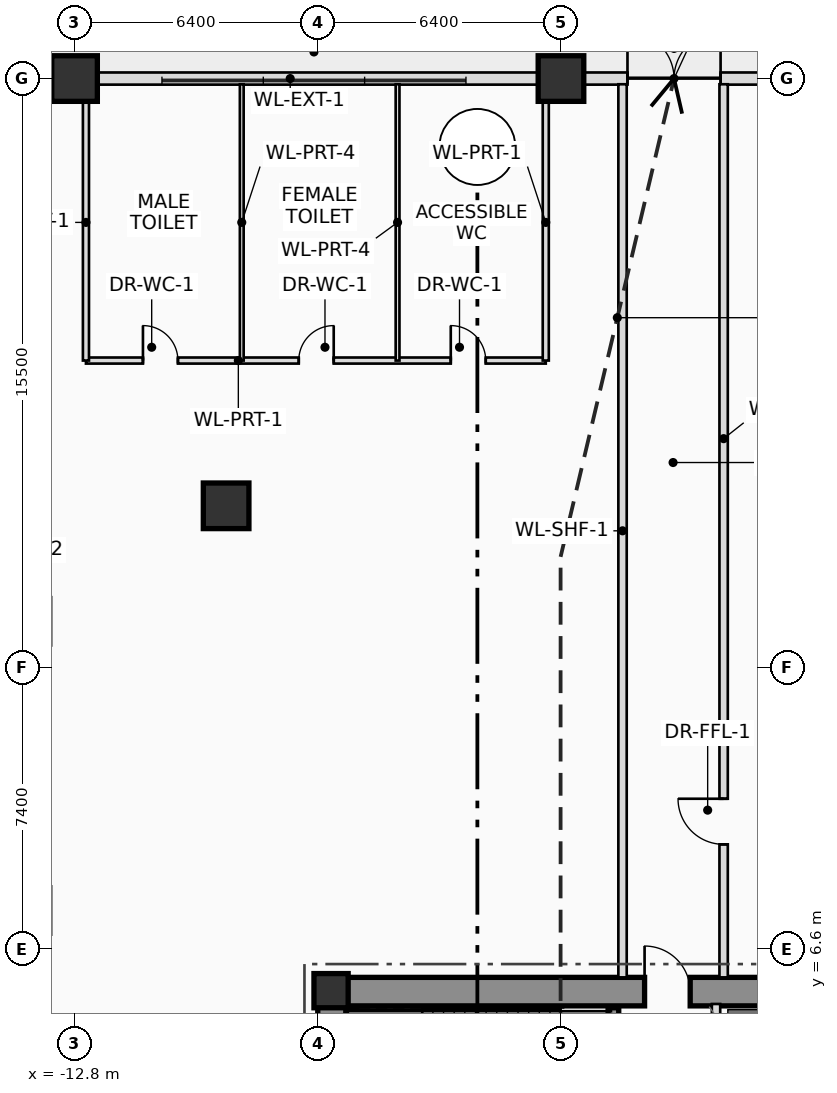
"""IFC4 building model, lengths in metres.
Left out: names, types, materials, properties, quantities, classifications, styles, units other than length and angle.
Written with IfcOpenShell. Run it as: python <this file> out.ifc"""

import sys

from ifc_helpers import new_model, si_unit, direction, frame, frame_2d, origin, origin_2d, place, context, subcontext, project, spatial, rectangle, extrude, source, transform, mapped, element, fill, save


model = new_model("IFC4")
c1 = context("Model", 3, precision=1e-05, world=origin(), true_north=direction((0.0, 1.0)))
c2 = subcontext(c1, "Body", "Model", "MODEL_VIEW")
j1 = project(units=[si_unit("LENGTHUNIT", "METRE"), si_unit("PLANEANGLEUNIT", "RADIAN")], contexts=[c1])
p1 = place(None, origin())
s1 = spatial("IfcSite", under=j1, at=p1, CompositionType="ELEMENT")
p2 = place(p1, origin())
s2 = spatial("IfcBuilding", under=s1, at=p2, CompositionType="ELEMENT")
p3 = place(p2, origin())
s3 = spatial("IfcBuildingStorey", under=s2, at=p3, CompositionType="ELEMENT", Elevation=0.0)
m1 = source(origin(), c2, "Body", "SweptSolid", [
    extrude(rectangle(XDim=0.9, YDim=0.9, at=origin_2d()), origin(), (0.0, 0.0, 1.0), 4.5),
])
p4 = place(p3, frame((-6.05, 5.5, 0.0), z_axis=(0.0, 0.0, 1.0), x_axis=(1.0, 0.0, 0.0)))
e1 = element("IfcColumn", 1, at=p4, inside=s3, PredefinedType="COLUMN", context=c2, shape_type="MappedRepresentation", body=[
    mapped(m1, transform((0.0, 0.0, 0.0), scale=1.0)),
])
p5 = place(p3, frame((-6.4, 5.475, 0.0), z_axis=(0.0, 0.0, 1.0), x_axis=(1.0, 0.0, 0.0)))
e2 = element("IfcWall", 2, at=p5, inside=s3, PredefinedType="SHEAR", context=c2, shape_type="SweptSolid", body=[
    extrude(rectangle(XDim=12.8, YDim=0.75, at=frame_2d((6.4, 0.0))), origin(), (0.0, 0.0, 1.0), 4.5),
])
p6 = place(p5, frame((8.6, 0.0, 0.0)))
e3 = element("IfcOpeningElement", 3, at=p6, cuts=e2, PredefinedType="OPENING", context=c2, shape_type="SweptSolid", body=[
    extrude(rectangle(XDim=1.2, YDim=2.2, at=frame_2d((0.6, 1.1))), frame((0.0, 0.385, 0.0), z_axis=(0.0, -1.0, 0.0), x_axis=(1.0, 0.0, 0.0)), (0.0, 0.0, 1.0), 0.77),
])
p7 = place(p3, frame((-6.025, 1.75, 0.0), z_axis=(0.0, 0.0, 1.0), x_axis=(0.0, 1.0, 0.0)))
e4 = element("IfcWall", 4, at=p7, inside=s3, PredefinedType="SHEAR", context=c2, shape_type="SweptSolid", body=[
    extrude(rectangle(XDim=3.35, YDim=0.75, at=frame_2d((1.675, 0.0))), origin(), (0.0, 0.0, 1.0), 4.5),
])
p8 = place(p3, frame((-5.52, 2.3, 0.0), z_axis=(0.0, 0.0, 1.0), x_axis=(0.0, 1.0, 0.0)))
e5 = element("IfcWall", 5, at=p8, inside=s3, PredefinedType="SHEAR", context=c2, shape_type="SweptSolid", body=[
    extrude(rectangle(XDim=2.75, YDim=0.28, at=frame_2d((1.375, 0.0))), origin(), (0.0, 0.0, 1.0), 4.5),
])
p9 = place(p3, frame((1.38, 4.25, 0.0), z_axis=(0.0, 0.0, 1.0), x_axis=(0.0, 1.0, 0.0)))
e6 = element("IfcWall", 6, at=p9, inside=s3, PredefinedType="SHEAR", context=c2, shape_type="SweptSolid", body=[
    extrude(rectangle(XDim=0.8, YDim=0.28, at=frame_2d((0.4, 0.0))), origin(), (0.0, 0.0, 1.0), 4.5),
])
m2 = source(origin(), c2, "Body", "SweptSolid", [
    extrude(rectangle(XDim=1.2, YDim=1.2, at=origin_2d()), origin(), (0.0, 0.0, 1.0), 4.5),
])
for number, where, z_axis, x_axis in (
    (7, (-12.8, 29.5, 0.0), (0.0, 0.0, 1.0), (1.0, 0.0, 0.0)),
    (8, (0.0, 29.5, 0.0), (0.0, 0.0, 1.0), (1.0, 0.0, 0.0)),
    (9, (-8.812, 18.258, 0.0), (0.0, 0.0, 1.0), (1.0, 0.0, 0.0)),
):
    element("IfcColumn", number, at=place(p3, frame(where, z_axis=z_axis, x_axis=x_axis)), inside=s3, PredefinedType="COLUMN", context=c2, shape_type="MappedRepresentation", body=[
        mapped(m2, transform((0.0, 0.0, 0.0), scale=1.0)),
    ])
p10 = place(p3, frame((-34.0, 29.5, 0.0), z_axis=(0.0, 0.0, 1.0), x_axis=(1.0, 0.0, 0.0)))
e10 = element("IfcWall", 10, at=p10, inside=s3, PredefinedType="SOLIDWALL", context=c2, shape_type="SweptSolid", body=[
    extrude(rectangle(XDim=68.0, YDim=0.32, at=frame_2d((34.0, 0.0))), origin(), (0.0, 0.0, 1.0), 3.25),
])
p11 = place(p10, frame((35.75, 0.0, 0.0)))
e11 = element("IfcOpeningElement", 11, at=p11, cuts=e10, PredefinedType="OPENING", context=c2, shape_type="SweptSolid", body=[
    extrude(rectangle(XDim=2.45, YDim=2.55, at=frame_2d((1.225, 1.275))), frame((0.0, 0.17, 0.0), z_axis=(0.0, -1.0, 0.0), x_axis=(1.0, 0.0, 0.0)), (0.0, 0.0, 1.0), 0.34),
])
p12 = place(p10, frame((15.5, 0.0, 0.0)))
e12 = element("IfcOpeningElement", 12, at=p12, cuts=e10, PredefinedType="OPENING", context=c2, shape_type="SweptSolid", body=[
    extrude(rectangle(XDim=2.5, YDim=2.6, at=frame_2d((1.25, 1.3))), frame((0.0, 0.17, 0.0), z_axis=(0.0, -1.0, 0.0), x_axis=(1.0, 0.0, 0.0)), (0.0, 0.0, 1.0), 0.34),
])
p13 = place(p10, frame((49.5, 0.0, 0.4)))
e13 = element("IfcOpeningElement", 13, at=p13, cuts=e10, PredefinedType="OPENING", context=c2, shape_type="SweptSolid", body=[
    extrude(rectangle(XDim=2.4, YDim=2.4, at=frame_2d((1.2, 1.2))), frame((0.0, 0.17, 0.0), z_axis=(0.0, -1.0, 0.0), x_axis=(1.0, 0.0, 0.0)), (0.0, 0.0, 1.0), 0.34),
])
p14 = place(p10, frame((59.5, 0.0, 0.4)))
e14 = element("IfcOpeningElement", 14, at=p14, cuts=e10, PredefinedType="OPENING", context=c2, shape_type="SweptSolid", body=[
    extrude(rectangle(XDim=2.4, YDim=2.4, at=frame_2d((1.2, 1.2))), frame((0.0, 0.17, 0.0), z_axis=(0.0, -1.0, 0.0), x_axis=(1.0, 0.0, 0.0)), (0.0, 0.0, 1.0), 0.34),
])
p15 = place(p3, frame((4.08, 2.2, 0.0), z_axis=(0.0, 0.0, 1.0), x_axis=(0.0, 1.0, 0.0)))
e15 = element("IfcWall", 15, at=p15, inside=s3, PredefinedType="PLUMBINGWALL", context=c2, shape_type="SweptSolid", body=[
    extrude(rectangle(XDim=2.95, YDim=0.22, at=frame_2d((1.475, 0.0))), origin(), (0.0, 0.0, 1.0), 4.17),
])
p16 = place(p15, frame((0.75, 0.0, 0.0)))
e16 = element("IfcOpeningElement", 16, at=p16, cuts=e15, PredefinedType="OPENING", context=c2, shape_type="SweptSolid", body=[
    extrude(rectangle(XDim=1.2, YDim=2.25, at=frame_2d((0.6, 1.125))), frame((0.0, 0.12, 0.0), z_axis=(0.0, -1.0, 0.0), x_axis=(1.0, 0.0, 0.0)), (0.0, 0.0, 1.0), 0.24),
])
p17 = place(p3, frame((-12.5, 22.08, 0.0), z_axis=(0.0, 0.0, 1.0), x_axis=(1.0, 0.0, 0.0)))
e17 = element("IfcWall", 17, at=p17, inside=s3, PredefinedType="PARTITIONING", context=c2, shape_type="SweptSolid", body=[
    extrude(rectangle(XDim=12.1, YDim=0.16, at=frame_2d((6.05, 0.0))), origin(), (0.0, 0.0, 1.0), 4.17),
])
p18 = place(p17, frame((1.5, 0.0, 0.0)))
e18 = element("IfcOpeningElement", 18, at=p18, cuts=e17, PredefinedType="OPENING", context=c2, shape_type="SweptSolid", body=[
    extrude(rectangle(XDim=0.92, YDim=2.1, at=frame_2d((0.46, 1.05))), frame((0.0, 0.09, 0.0), z_axis=(0.0, -1.0, 0.0), x_axis=(1.0, 0.0, 0.0)), (0.0, 0.0, 1.0), 0.18),
])
p19 = place(p17, frame((5.6, 0.0, 0.0)))
e19 = element("IfcOpeningElement", 19, at=p19, cuts=e17, PredefinedType="OPENING", context=c2, shape_type="SweptSolid", body=[
    extrude(rectangle(XDim=0.92, YDim=2.1, at=frame_2d((0.46, 1.05))), frame((0.0, 0.09, 0.0), z_axis=(0.0, -1.0, 0.0), x_axis=(1.0, 0.0, 0.0)), (0.0, 0.0, 1.0), 0.18),
])
p20 = place(p17, frame((9.6, 0.0, 0.0)))
e20 = element("IfcOpeningElement", 20, at=p20, cuts=e17, PredefinedType="OPENING", context=c2, shape_type="SweptSolid", body=[
    extrude(rectangle(XDim=0.92, YDim=2.1, at=frame_2d((0.46, 1.05))), frame((0.0, 0.09, 0.0), z_axis=(0.0, -1.0, 0.0), x_axis=(1.0, 0.0, 0.0)), (0.0, 0.0, 1.0), 0.18),
])
p21 = place(p3, frame((-12.5, 22.08, 0.0), z_axis=(0.0, 0.0, 1.0), x_axis=(0.0, 1.0, 0.0)))
e21 = element("IfcWall", 21, at=p21, inside=s3, PredefinedType="PARTITIONING", context=c2, shape_type="SweptSolid", body=[
    extrude(rectangle(XDim=7.27, YDim=0.16, at=frame_2d((3.635, 0.0))), origin(), (0.0, 0.0, 1.0), 4.17),
])
for number, where, z_axis, x_axis in (
    (22, (-8.4, 22.08, 0.0), (0.0, 0.0, 1.0), (0.0, 1.0, 0.0)),
    (23, (-4.3, 22.08, 0.0), (0.0, 0.0, 1.0), (0.0, 1.0, 0.0)),
):
    element("IfcWall", number, at=place(p3, frame(where, z_axis=z_axis, x_axis=x_axis)), inside=s3, PredefinedType="PARTITIONING", context=c2, shape_type="SweptSolid", body=[
        extrude(rectangle(XDim=7.27, YDim=0.1, at=frame_2d((3.635, 0.0))), origin(), (0.0, 0.0, 1.0), 4.17),
    ])
p22 = place(p3, frame((-0.4, 22.08, 0.0), z_axis=(0.0, 0.0, 1.0), x_axis=(0.0, 1.0, 0.0)))
e24 = element("IfcWall", 24, at=p22, inside=s3, PredefinedType="PARTITIONING", context=c2, shape_type="SweptSolid", body=[
    extrude(rectangle(XDim=7.27, YDim=0.16, at=frame_2d((3.635, 0.0))), origin(), (0.0, 0.0, 1.0), 4.17),
])
p23 = place(p3, frame((1.62, 5.85, 0.0), z_axis=(0.0, 0.0, 1.0), x_axis=(0.0, 1.0, 0.0)))
e25 = element("IfcWall", 25, at=p23, inside=s3, PredefinedType="PLUMBINGWALL", context=c2, shape_type="SweptSolid", body=[
    extrude(rectangle(XDim=23.5, YDim=0.22, at=frame_2d((11.75, 0.0))), origin(), (0.0, 0.0, 1.0), 3.275),
])
p24 = place(p3, frame((4.28, 5.85, 0.0), z_axis=(0.0, 0.0, 1.0), x_axis=(0.0, 1.0, 0.0)))
e26 = element("IfcWall", 26, at=p24, inside=s3, PredefinedType="PLUMBINGWALL", context=c2, shape_type="SweptSolid", body=[
    extrude(rectangle(XDim=23.5, YDim=0.22, at=frame_2d((11.75, 0.0))), origin(), (0.0, 0.0, 1.0), 3.275),
])
p25 = place(p24, frame((3.5, 0.0, 0.0)))
e27 = element("IfcOpeningElement", 27, at=p25, cuts=e26, PredefinedType="OPENING", context=c2, shape_type="SweptSolid", body=[
    extrude(rectangle(XDim=1.2, YDim=2.2, at=frame_2d((0.6, 1.1))), frame((0.0, 0.12, 0.0), z_axis=(0.0, -1.0, 0.0), x_axis=(1.0, 0.0, 0.0)), (0.0, 0.0, 1.0), 0.24),
])
p26 = place(p11, origin())
e28 = element("IfcDoor", 28, at=p26, inside=s3, OperationType="DOUBLE_DOOR_SINGLE_SWING", PredefinedType="DOOR", context=c2, shape_type="SweptSolid", body=[
    extrude(rectangle(XDim=2.45, YDim=2.55, at=frame_2d((1.225, 1.275))), frame((0.0, 0.025, 0.0), z_axis=(0.0, -1.0, 0.0), x_axis=(1.0, 0.0, 0.0)), (0.0, 0.0, 1.0), 0.05),
])
fill(e11, e28)
p27 = place(p6, origin())
e29 = element("IfcDoor", 29, at=p27, inside=s3, OperationType="SINGLE_SWING_LEFT", PredefinedType="DOOR", context=c2, shape_type="SweptSolid", body=[
    extrude(rectangle(XDim=1.2, YDim=2.2, at=frame_2d((0.6, 1.1))), frame((0.0, 0.025, 0.0), z_axis=(0.0, -1.0, 0.0), x_axis=(1.0, 0.0, 0.0)), (0.0, 0.0, 1.0), 0.05),
])
fill(e3, e29)
p28 = place(p18, origin())
e30 = element("IfcDoor", 30, at=p28, inside=s3, OperationType="SINGLE_SWING_LEFT", PredefinedType="DOOR", context=c2, shape_type="SweptSolid", body=[
    extrude(rectangle(XDim=0.92, YDim=2.1, at=frame_2d((0.46, 1.05))), frame((0.0, 0.025, 0.0), z_axis=(0.0, -1.0, 0.0), x_axis=(1.0, 0.0, 0.0)), (0.0, 0.0, 1.0), 0.05),
])
fill(e18, e30)
p29 = place(p19, origin())
e31 = element("IfcDoor", 31, at=p29, inside=s3, OperationType="SINGLE_SWING_RIGHT", PredefinedType="DOOR", context=c2, shape_type="SweptSolid", body=[
    extrude(rectangle(XDim=0.92, YDim=2.1, at=frame_2d((0.46, 1.05))), frame((0.0, 0.025, 0.0), z_axis=(0.0, -1.0, 0.0), x_axis=(1.0, 0.0, 0.0)), (0.0, 0.0, 1.0), 0.05),
])
fill(e19, e31)
p30 = place(p20, origin())
e32 = element("IfcDoor", 32, at=p30, inside=s3, OperationType="SINGLE_SWING_LEFT", PredefinedType="DOOR", context=c2, shape_type="SweptSolid", body=[
    extrude(rectangle(XDim=0.92, YDim=2.1, at=frame_2d((0.46, 1.05))), frame((0.0, 0.025, 0.0), z_axis=(0.0, -1.0, 0.0), x_axis=(1.0, 0.0, 0.0)), (0.0, 0.0, 1.0), 0.05),
])
fill(e20, e32)
p31 = place(p25, origin())
e33 = element("IfcDoor", 33, at=p31, inside=s3, OperationType="SINGLE_SWING_RIGHT", PredefinedType="DOOR", context=c2, shape_type="SweptSolid", body=[
    extrude(rectangle(XDim=1.2, YDim=2.2, at=frame_2d((0.6, 1.1))), frame((0.0, 0.025, 0.0), z_axis=(0.0, -1.0, 0.0), x_axis=(1.0, 0.0, 0.0)), (0.0, 0.0, 1.0), 0.05),
])
fill(e27, e33)
save(model, sys.argv[1])
